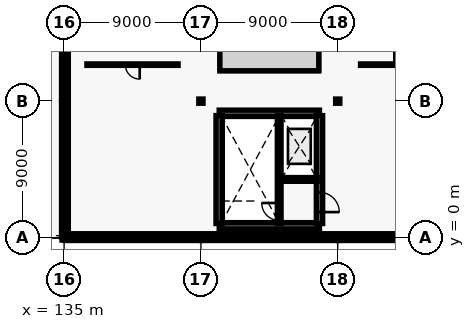
"""IFC4 building model, lengths in metres.
Left out: names, types, materials, properties, quantities, classifications, styles, units other than length and angle.
Written with IfcOpenShell. Run it as: python <this file> out.ifc"""

import sys

from ifc_helpers import new_model, si_unit, direction, frame, frame_2d, origin, origin_2d, place, context, subcontext, project, spatial, rectangle, i_section, extrude, element, fill, save


model = new_model("IFC4")
c1 = context("Model", 3, precision=1e-05, world=origin(), true_north=direction((0.0, 1.0)))
c2 = subcontext(c1, "Body", "Model", "MODEL_VIEW")
j1 = project(units=[si_unit("LENGTHUNIT", "METRE"), si_unit("PLANEANGLEUNIT", "RADIAN")], contexts=[c1])
p1 = place(None, origin())
s1 = spatial("IfcSite", under=j1, at=p1, CompositionType="ELEMENT")
p2 = place(p1, origin())
s2 = spatial("IfcBuilding", under=s1, at=p2, CompositionType="ELEMENT")
p3 = place(p2, frame((0.0, 0.0, 13.5)))
s3 = spatial("IfcBuildingStorey", under=s2, at=p3, CompositionType="ELEMENT", Elevation=13.5)
for number, where, z_axis, x_axis in (
    (1, (135.0, 0.0, 0.0), (0.0, 0.0, 1.0), (1.0, 0.0, 0.0)),
    (2, (135.0, 9.0, 0.0), (0.0, 0.0, 1.0), (1.0, 0.0, 0.0)),
    (3, (144.0, 0.0, 0.0), (0.0, 0.0, 1.0), (1.0, 0.0, 0.0)),
    (4, (144.0, 9.0, 0.0), (0.0, 0.0, 1.0), (1.0, 0.0, 0.0)),
    (5, (153.0, 0.0, 0.0), (0.0, 0.0, 1.0), (1.0, 0.0, 0.0)),
    (6, (153.0, 9.0, 0.0), (0.0, 0.0, 1.0), (1.0, 0.0, 0.0)),
):
    element("IfcColumn", number, at=place(p3, frame(where, z_axis=z_axis, x_axis=x_axis)), inside=s3, PredefinedType="COLUMN", context=c2, shape_type="SweptSolid", body=[
        extrude(i_section(OverallWidth=0.28, OverallDepth=0.28, WebThickness=0.01, FlangeThickness=0.018, FilletRadius=0.024, at=origin_2d()), origin(), (0.0, 0.0, 1.0), 3.9),
    ])
p4 = place(p3, frame((135.06, 0.0, 0.0), z_axis=(0.0, 0.0, 1.0), x_axis=(1.0, 0.0, 0.0)))
e7 = element("IfcWall", 7, at=p4, inside=s3, PredefinedType="SOLIDWALL", context=c2, shape_type="SweptSolid", body=[
    extrude(rectangle(XDim=8.88, YDim=0.34, at=frame_2d((4.44, 0.0))), origin(), (0.0, 0.0, 1.0), 3.2),
])
p5 = place(p4, frame((1.486, 0.0, 0.9)))
e8 = element("IfcOpeningElement", 8, at=p5, cuts=e7, PredefinedType="OPENING", context=c2, shape_type="SweptSolid", body=[
    extrude(rectangle(XDim=2.0, YDim=1.5, at=frame_2d((1.0, 0.75))), frame((0.0, 0.18, 0.0), z_axis=(0.0, -1.0, 0.0), x_axis=(1.0, 0.0, 0.0)), (0.0, 0.0, 1.0), 0.36),
])
p6 = place(p4, frame((5.394, 0.0, 0.9)))
e9 = element("IfcOpeningElement", 9, at=p6, cuts=e7, PredefinedType="OPENING", context=c2, shape_type="SweptSolid", body=[
    extrude(rectangle(XDim=2.0, YDim=1.5, at=frame_2d((1.0, 0.75))), frame((0.0, 0.18, 0.0), z_axis=(0.0, -1.0, 0.0), x_axis=(1.0, 0.0, 0.0)), (0.0, 0.0, 1.0), 0.36),
])
p7 = place(p3, frame((144.06, 0.0, 0.0), z_axis=(0.0, 0.0, 1.0), x_axis=(1.0, 0.0, 0.0)))
e10 = element("IfcWall", 10, at=p7, inside=s3, PredefinedType="SOLIDWALL", context=c2, shape_type="SweptSolid", body=[
    extrude(rectangle(XDim=8.88, YDim=0.34, at=frame_2d((4.44, 0.0))), origin(), (0.0, 0.0, 1.0), 3.2),
])
p8 = place(p7, frame((1.486, 0.0, 0.9)))
e11 = element("IfcOpeningElement", 11, at=p8, cuts=e10, PredefinedType="OPENING", context=c2, shape_type="SweptSolid", body=[
    extrude(rectangle(XDim=2.0, YDim=1.5, at=frame_2d((1.0, 0.75))), frame((0.0, 0.18, 0.0), z_axis=(0.0, -1.0, 0.0), x_axis=(1.0, 0.0, 0.0)), (0.0, 0.0, 1.0), 0.36),
])
p9 = place(p7, frame((5.394, 0.0, 0.9)))
e12 = element("IfcOpeningElement", 12, at=p9, cuts=e10, PredefinedType="OPENING", context=c2, shape_type="SweptSolid", body=[
    extrude(rectangle(XDim=2.0, YDim=1.5, at=frame_2d((1.0, 0.75))), frame((0.0, 0.18, 0.0), z_axis=(0.0, -1.0, 0.0), x_axis=(1.0, 0.0, 0.0)), (0.0, 0.0, 1.0), 0.36),
])
p10 = place(p3, frame((153.06, 0.0, 0.0), z_axis=(0.0, 0.0, 1.0), x_axis=(1.0, 0.0, 0.0)))
e13 = element("IfcWall", 13, at=p10, inside=s3, PredefinedType="SOLIDWALL", context=c2, shape_type="SweptSolid", body=[
    extrude(rectangle(XDim=8.88, YDim=0.34, at=frame_2d((4.44, 0.0))), origin(), (0.0, 0.0, 1.0), 3.2),
])
p11 = place(p10, frame((1.486, 0.0, 0.9)))
e14 = element("IfcOpeningElement", 14, at=p11, cuts=e13, PredefinedType="OPENING", context=c2, shape_type="SweptSolid", body=[
    extrude(rectangle(XDim=2.0, YDim=1.5, at=frame_2d((1.0, 0.75))), frame((0.0, 0.18, 0.0), z_axis=(0.0, -1.0, 0.0), x_axis=(1.0, 0.0, 0.0)), (0.0, 0.0, 1.0), 0.36),
])
p12 = place(p10, frame((5.394, 0.0, 0.9)))
e15 = element("IfcOpeningElement", 15, at=p12, cuts=e13, PredefinedType="OPENING", context=c2, shape_type="SweptSolid", body=[
    extrude(rectangle(XDim=2.0, YDim=1.5, at=frame_2d((1.0, 0.75))), frame((0.0, 0.18, 0.0), z_axis=(0.0, -1.0, 0.0), x_axis=(1.0, 0.0, 0.0)), (0.0, 0.0, 1.0), 0.36),
])
p13 = place(p3, frame((135.0, 0.06, 0.0), z_axis=(0.0, 0.0, 1.0), x_axis=(0.0, 1.0, 0.0)))
e16 = element("IfcWall", 16, at=p13, inside=s3, PredefinedType="SOLIDWALL", context=c2, shape_type="SweptSolid", body=[
    extrude(rectangle(XDim=8.88, YDim=0.34, at=frame_2d((4.44, 0.0))), origin(), (0.0, 0.0, 1.0), 3.2),
])
p14 = place(p3, frame((135.0, 9.06, 0.0), z_axis=(0.0, 0.0, 1.0), x_axis=(0.0, 1.0, 0.0)))
e17 = element("IfcWall", 17, at=p14, inside=s3, PredefinedType="SOLIDWALL", context=c2, shape_type="SweptSolid", body=[
    extrude(rectangle(XDim=8.88, YDim=0.34, at=frame_2d((4.44, 0.0))), origin(), (0.0, 0.0, 1.0), 3.2),
])
p15 = place(p14, frame((3.89, 0.0, 0.0)))
e18 = element("IfcOpeningElement", 18, at=p15, cuts=e17, PredefinedType="OPENING", context=c2, shape_type="SweptSolid", body=[
    extrude(rectangle(XDim=1.1, YDim=2.15, at=frame_2d((0.55, 1.075))), frame((0.0, 0.18, 0.0), z_axis=(0.0, -1.0, 0.0), x_axis=(1.0, 0.0, 0.0)), (0.0, 0.0, 1.0), 0.36),
])
p16 = place(p3, frame((135.14, 0.14, 3.9), z_axis=(0.0, 0.0, 1.0), x_axis=(1.0, 0.0, 0.0)))
e19 = element("IfcWall", 19, at=p16, inside=s3, PredefinedType="PARAPET", context=c2, shape_type="SweptSolid", body=[
    extrude(rectangle(XDim=53.72, YDim=0.28, at=frame_2d((26.86, 0.0))), origin(), (0.0, 0.0, 1.0), 1.2),
])
p17 = place(p3, frame((135.14, 0.14, 3.9), z_axis=(0.0, 0.0, 1.0), x_axis=(0.0, 1.0, 0.0)))
e20 = element("IfcWall", 20, at=p17, inside=s3, PredefinedType="PARAPET", context=c2, shape_type="SweptSolid", body=[
    extrude(rectangle(XDim=17.72, YDim=0.28, at=frame_2d((8.86, 0.0))), origin(), (0.0, 0.0, 1.0), 1.2),
])
for number, where, z_axis, x_axis in (
    (21, (145.2, 0.8, 0.0), (0.0, 0.0, 1.0), (1.0, 0.0, 0.0)),
    (22, (145.2, 8.2, 0.0), (0.0, 0.0, 1.0), (1.0, 0.0, 0.0)),
):
    element("IfcWall", number, at=place(p3, frame(where, z_axis=z_axis, x_axis=x_axis)), inside=s3, PredefinedType="SHEAR", context=c2, shape_type="SweptSolid", body=[
        extrude(rectangle(XDim=6.6, YDim=0.42, at=frame_2d((3.3, 0.0))), origin(), (0.0, 0.0, 1.0), 3.7),
    ])
p18 = place(p3, frame((145.2, 0.95, 0.0), z_axis=(0.0, 0.0, 1.0), x_axis=(0.0, 1.0, 0.0)))
e23 = element("IfcWall", 23, at=p18, inside=s3, PredefinedType="SHEAR", context=c2, shape_type="SweptSolid", body=[
    extrude(rectangle(XDim=7.1, YDim=0.42, at=frame_2d((3.55, 0.0))), origin(), (0.0, 0.0, 1.0), 3.7),
])
p19 = place(p3, frame((151.8, 0.95, 0.0), z_axis=(0.0, 0.0, 1.0), x_axis=(0.0, 1.0, 0.0)))
e24 = element("IfcWall", 24, at=p19, inside=s3, PredefinedType="SHEAR", context=c2, shape_type="SweptSolid", body=[
    extrude(rectangle(XDim=7.1, YDim=0.42, at=frame_2d((3.55, 0.0))), origin(), (0.0, 0.0, 1.0), 3.7),
])
p20 = place(p19, frame((0.75, 0.0, 0.0)))
e25 = element("IfcOpeningElement", 25, at=p20, cuts=e24, PredefinedType="OPENING", context=c2, shape_type="SweptSolid", body=[
    extrude(rectangle(XDim=1.3, YDim=2.15, at=frame_2d((0.65, 1.075))), frame((0.0, 0.22, 0.0), z_axis=(0.0, -1.0, 0.0), x_axis=(1.0, 0.0, 0.0)), (0.0, 0.0, 1.0), 0.44),
])
p21 = place(p3, frame((149.15, 0.95, 0.0), z_axis=(0.0, 0.0, 1.0), x_axis=(0.0, 1.0, 0.0)))
e26 = element("IfcWall", 26, at=p21, inside=s3, PredefinedType="SHEAR", context=c2, shape_type="SweptSolid", body=[
    extrude(rectangle(XDim=7.1, YDim=0.25, at=frame_2d((3.55, 0.0))), origin(), (0.0, 0.0, 1.0), 3.7),
])
p22 = place(p21, frame((0.2, 0.0, 0.0)))
e27 = element("IfcOpeningElement", 27, at=p22, cuts=e26, PredefinedType="OPENING", context=c2, shape_type="SweptSolid", body=[
    extrude(rectangle(XDim=1.15, YDim=2.15, at=frame_2d((0.575, 1.075))), frame((0.0, 0.135, 0.0), z_axis=(0.0, -1.0, 0.0), x_axis=(1.0, 0.0, 0.0)), (0.0, 0.0, 1.0), 0.27),
])
p23 = place(p3, frame((149.27, 3.85, 0.0), z_axis=(0.0, 0.0, 1.0), x_axis=(1.0, 0.0, 0.0)))
e28 = element("IfcWall", 28, at=p23, inside=s3, PredefinedType="SHEAR", context=c2, shape_type="SweptSolid", body=[
    extrude(rectangle(XDim=2.38, YDim=0.25, at=frame_2d((1.19, 0.0))), origin(), (0.0, 0.0, 1.0), 3.7),
])
p24 = place(p23, frame((0.64, 0.0, 0.0)))
e29 = element("IfcOpeningElement", 29, at=p24, cuts=e28, PredefinedType="OPENING", context=c2, shape_type="SweptSolid", body=[
    extrude(rectangle(XDim=1.1, YDim=2.15, at=frame_2d((0.55, 1.075))), frame((0.0, 0.135, 0.0), z_axis=(0.0, -1.0, 0.0), x_axis=(1.0, 0.0, 0.0)), (0.0, 0.0, 1.0), 0.27),
])
p25 = place(p3, frame((136.5, 11.4, 0.0), z_axis=(0.0, 0.0, 1.0), x_axis=(1.0, 0.0, 0.0)))
e30 = element("IfcWall", 30, at=p25, inside=s3, PredefinedType="PARTITIONING", context=c2, shape_type="SweptSolid", body=[
    extrude(rectangle(XDim=6.0, YDim=0.1, at=frame_2d((3.0, 0.0))), origin(), (0.0, 0.0, 1.0), 2.9),
])
p26 = place(p25, frame((2.525, 0.0, 0.0)))
e31 = element("IfcOpeningElement", 31, at=p26, cuts=e30, PredefinedType="OPENING", context=c2, shape_type="SweptSolid", body=[
    extrude(rectangle(XDim=0.95, YDim=2.1, at=frame_2d((0.475, 1.05))), frame((0.0, 0.06, 0.0), z_axis=(0.0, -1.0, 0.0), x_axis=(1.0, 0.0, 0.0)), (0.0, 0.0, 1.0), 0.12),
])
p27 = place(p3, frame((154.5, 11.4, 0.0), z_axis=(0.0, 0.0, 1.0), x_axis=(1.0, 0.0, 0.0)))
e32 = element("IfcWall", 32, at=p27, inside=s3, PredefinedType="PARTITIONING", context=c2, shape_type="SweptSolid", body=[
    extrude(rectangle(XDim=6.0, YDim=0.1, at=frame_2d((3.0, 0.0))), origin(), (0.0, 0.0, 1.0), 2.9),
])
p28 = place(p27, frame((2.225, 0.0, 0.0)))
e33 = element("IfcOpeningElement", 33, at=p28, cuts=e32, PredefinedType="OPENING", context=c2, shape_type="SweptSolid", body=[
    extrude(rectangle(XDim=1.55, YDim=2.25, at=frame_2d((0.775, 1.125))), frame((0.0, 0.06, 0.0), z_axis=(0.0, -1.0, 0.0), x_axis=(1.0, 0.0, 0.0)), (0.0, 0.0, 1.0), 0.12),
])
p29 = place(p5, origin())
e34 = element("IfcWindow", 34, at=p29, inside=s3, PartitioningType="SINGLE_PANEL", PredefinedType="WINDOW", context=c2, shape_type="SweptSolid", body=[
    extrude(rectangle(XDim=2.0, YDim=1.5, at=frame_2d((1.0, 0.75))), frame((0.0, 0.03, 0.0), z_axis=(0.0, -1.0, 0.0), x_axis=(1.0, 0.0, 0.0)), (0.0, 0.0, 1.0), 0.06),
])
fill(e8, e34)
p30 = place(p6, origin())
e35 = element("IfcWindow", 35, at=p30, inside=s3, PartitioningType="SINGLE_PANEL", PredefinedType="WINDOW", context=c2, shape_type="SweptSolid", body=[
    extrude(rectangle(XDim=2.0, YDim=1.5, at=frame_2d((1.0, 0.75))), frame((0.0, 0.03, 0.0), z_axis=(0.0, -1.0, 0.0), x_axis=(1.0, 0.0, 0.0)), (0.0, 0.0, 1.0), 0.06),
])
fill(e9, e35)
p31 = place(p8, origin())
e36 = element("IfcWindow", 36, at=p31, inside=s3, PartitioningType="SINGLE_PANEL", PredefinedType="WINDOW", context=c2, shape_type="SweptSolid", body=[
    extrude(rectangle(XDim=2.0, YDim=1.5, at=frame_2d((1.0, 0.75))), frame((0.0, 0.03, 0.0), z_axis=(0.0, -1.0, 0.0), x_axis=(1.0, 0.0, 0.0)), (0.0, 0.0, 1.0), 0.06),
])
fill(e11, e36)
p32 = place(p9, origin())
e37 = element("IfcWindow", 37, at=p32, inside=s3, PartitioningType="SINGLE_PANEL", PredefinedType="WINDOW", context=c2, shape_type="SweptSolid", body=[
    extrude(rectangle(XDim=2.0, YDim=1.5, at=frame_2d((1.0, 0.75))), frame((0.0, 0.03, 0.0), z_axis=(0.0, -1.0, 0.0), x_axis=(1.0, 0.0, 0.0)), (0.0, 0.0, 1.0), 0.06),
])
fill(e12, e37)
p33 = place(p11, origin())
e38 = element("IfcWindow", 38, at=p33, inside=s3, PartitioningType="SINGLE_PANEL", PredefinedType="WINDOW", context=c2, shape_type="SweptSolid", body=[
    extrude(rectangle(XDim=2.0, YDim=1.5, at=frame_2d((1.0, 0.75))), frame((0.0, 0.03, 0.0), z_axis=(0.0, -1.0, 0.0), x_axis=(1.0, 0.0, 0.0)), (0.0, 0.0, 1.0), 0.06),
])
fill(e14, e38)
p34 = place(p20, frame((1.3, 0.0, 0.0), z_axis=(0.0, 0.0, 1.0), x_axis=(-1.0, 0.0, 0.0)))
e39 = element("IfcDoor", 39, at=p34, inside=s3, OperationType="DOUBLE_DOOR_SINGLE_SWING", PredefinedType="DOOR", context=c2, shape_type="SweptSolid", body=[
    extrude(rectangle(XDim=1.3, YDim=2.15, at=frame_2d((0.65, 1.075))), frame((0.0, 0.025, 0.0), z_axis=(0.0, -1.0, 0.0), x_axis=(1.0, 0.0, 0.0)), (0.0, 0.0, 1.0), 0.05),
])
fill(e25, e39)
p35 = place(p22, frame((1.15, 0.0, 0.0), z_axis=(0.0, 0.0, 1.0), x_axis=(-1.0, 0.0, 0.0)))
e40 = element("IfcDoor", 40, at=p35, inside=s3, OperationType="SINGLE_SWING_RIGHT", PredefinedType="DOOR", context=c2, shape_type="SweptSolid", body=[
    extrude(rectangle(XDim=1.15, YDim=2.15, at=frame_2d((0.575, 1.075))), frame((0.0, 0.025, 0.0), z_axis=(0.0, -1.0, 0.0), x_axis=(1.0, 0.0, 0.0)), (0.0, 0.0, 1.0), 0.05),
])
fill(e27, e40)
p36 = place(p24, origin())
e41 = element("IfcDoor", 41, at=p36, inside=s3, OperationType="SLIDING_TO_LEFT", PredefinedType="DOOR", context=c2, shape_type="SweptSolid", body=[
    extrude(rectangle(XDim=1.1, YDim=2.15, at=frame_2d((0.55, 1.075))), frame((0.0, 0.025, 0.0), z_axis=(0.0, -1.0, 0.0), x_axis=(1.0, 0.0, 0.0)), (0.0, 0.0, 1.0), 0.05),
])
fill(e29, e41)
p37 = place(p26, origin())
e42 = element("IfcDoor", 42, at=p37, inside=s3, OperationType="SINGLE_SWING_RIGHT", PredefinedType="DOOR", context=c2, shape_type="SweptSolid", body=[
    extrude(rectangle(XDim=0.95, YDim=2.1, at=frame_2d((0.475, 1.05))), frame((0.0, 0.025, 0.0), z_axis=(0.0, -1.0, 0.0), x_axis=(1.0, 0.0, 0.0)), (0.0, 0.0, 1.0), 0.05),
])
fill(e31, e42)
p38 = place(p28, origin())
e43 = element("IfcDoor", 43, at=p38, inside=s3, OperationType="SINGLE_SWING_LEFT", PredefinedType="DOOR", context=c2, shape_type="SweptSolid", body=[
    extrude(rectangle(XDim=1.55, YDim=2.25, at=frame_2d((0.775, 1.125))), frame((0.0, 0.025, 0.0), z_axis=(0.0, -1.0, 0.0), x_axis=(1.0, 0.0, 0.0)), (0.0, 0.0, 1.0), 0.05),
])
fill(e33, e43)
save(model, sys.argv[1])
